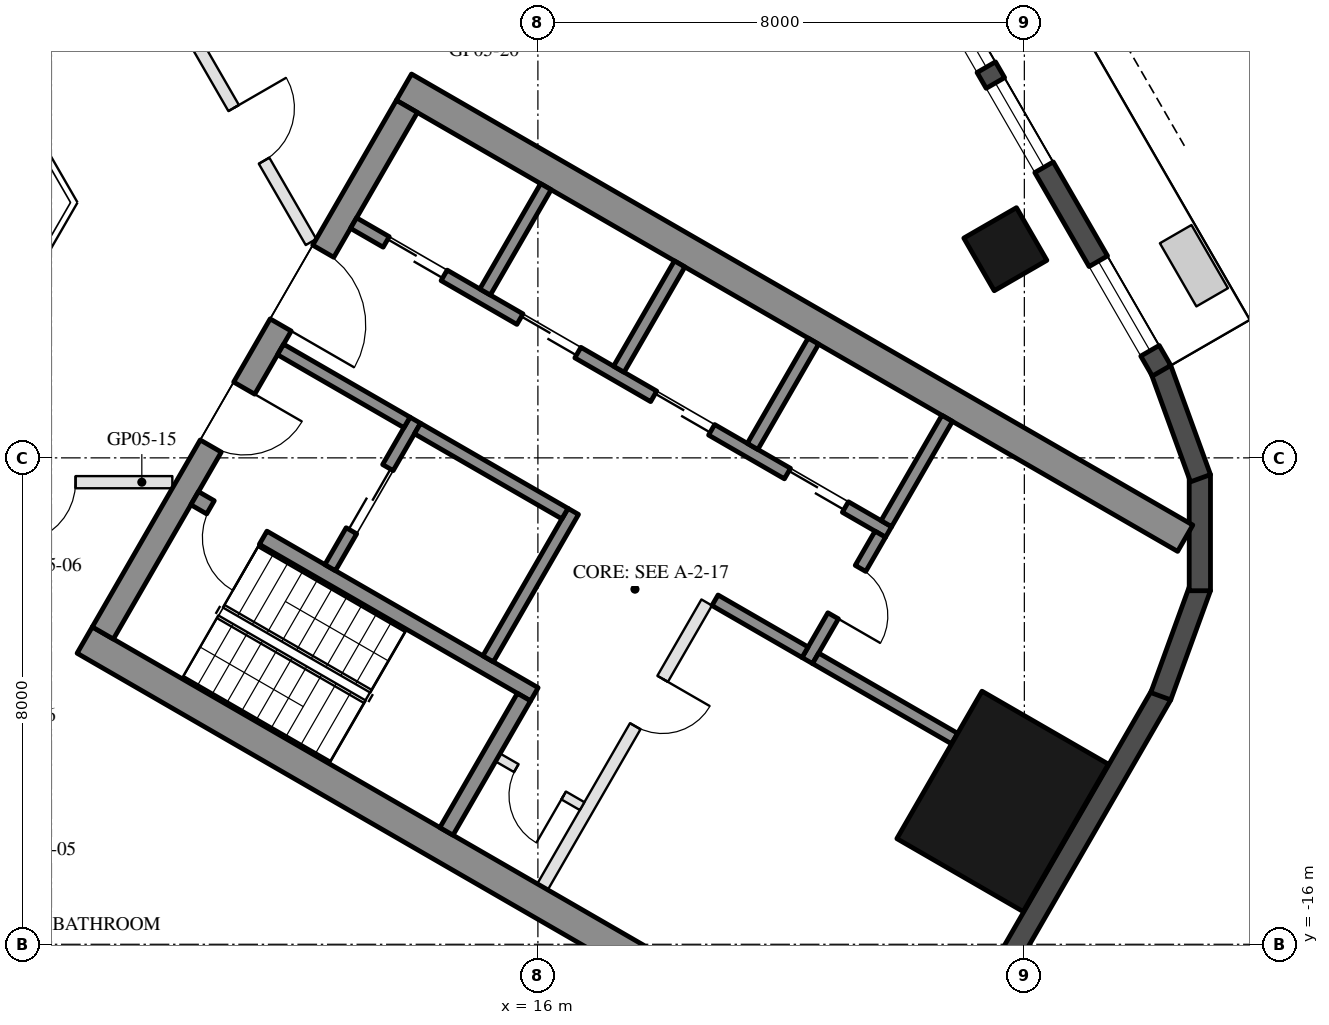
"""IFC4 building model, lengths in metres.
Left out: names, types, materials, properties, quantities, classifications, styles, units other than length and angle.
Written with IfcOpenShell. Run it as: python <this file> out.ifc"""

import sys

from ifc_helpers import new_model, si_unit, direction, frame, frame_2d, origin, origin_2d, place, context, subcontext, project, spatial, rectangle, hollow_rectangle, extrude, element, fill, save


model = new_model("IFC4")
c1 = context("Model", 3, precision=1e-05, world=origin(), true_north=direction((0.0, 1.0)))
c2 = subcontext(c1, "Body", "Model", "MODEL_VIEW")
j1 = project(units=[si_unit("LENGTHUNIT", "METRE"), si_unit("PLANEANGLEUNIT", "RADIAN")], contexts=[c1])
p1 = place(None, origin())
s1 = spatial("IfcSite", under=j1, at=p1, CompositionType="ELEMENT")
p2 = place(p1, origin())
s2 = spatial("IfcBuilding", under=s1, at=p2, CompositionType="ELEMENT")
p3 = place(p2, frame((0.0, 0.0, 83.5)))
s3 = spatial("IfcBuildingStorey", under=s2, at=p3, CompositionType="ELEMENT", Elevation=83.5)
p4 = place(p3, frame((23.688, -4.568, 0.0), z_axis=(0.0, 0.0, 1.0), x_axis=(-0.5, 0.866025403784, 0.0)))
e1 = element("IfcColumn", 1, at=p4, inside=s3, PredefinedType="COLUMN", context=c2, shape_type="SweptSolid", body=[
    extrude(hollow_rectangle(XDim=1.0, YDim=1.0, WallThickness=0.045, at=origin_2d()), origin(), (0.0, 0.0, 1.0), 3.7),
])
p5 = place(p3, frame((23.643, -13.65, 0.0), z_axis=(0.0, 0.0, 1.0), x_axis=(0.5, 0.866025403784, 0.0)))
e2 = element("IfcColumn", 2, at=p5, inside=s3, PredefinedType="COLUMN", context=c2, shape_type="SweptSolid", body=[
    extrude(hollow_rectangle(XDim=2.8, YDim=2.4, WallThickness=0.07, at=origin_2d()), origin(), (0.0, 0.0, 1.0), 3.7),
])
p6 = place(p3, frame((23.427, -16.792, 0.0), z_axis=(0.0, 0.0, 1.0), x_axis=(0.500018773155, 0.866014564827, 0.0)))
e3 = element("IfcWall", 3, at=p6, inside=s3, PredefinedType="SOLIDWALL", context=c2, shape_type="SweptSolid", body=[
    extrude(rectangle(XDim=5.658, YDim=0.35, at=frame_2d((2.829, 0.0))), origin(), (0.0, 0.0, 1.0), 3.55),
])
for number, where, z_axis, x_axis in (
    (4, (26.244, -11.92, 0.0), (0.0, 0.0, 1.0), (0.342, 0.94, 0.0)),
    (5, (26.886, -10.185, 0.0), (0.0, 0.0, 1.0), (0.0, 1.0, 0.0)),
    (6, (26.897, -8.335, 0.0), (0.0, 0.0, 1.0), (-0.342, 0.94, 0.0)),
):
    element("IfcWall", number, at=place(p3, frame(where, z_axis=z_axis, x_axis=x_axis)), inside=s3, PredefinedType="SOLIDWALL", context=c2, shape_type="SweptSolid", body=[
        extrude(rectangle(XDim=1.91, YDim=0.35, at=frame_2d((0.955, 0.0))), origin(), (0.0, 0.0, 1.0), 3.55),
    ])
p7 = place(p3, frame((26.257, -6.567, 0.0), z_axis=(0.0, 0.0, 1.0), x_axis=(-0.500023526245, 0.866011820475, 0.0)))
e7 = element("IfcWall", 7, at=p7, inside=s3, PredefinedType="SOLIDWALL", context=c2, shape_type="SweptSolid", body=[
    extrude(rectangle(XDim=11.816, YDim=0.35, at=frame_2d((5.908, 0.0))), origin(), (0.0, 0.0, 1.0), 3.55),
])
p8 = place(p7, frame((0.38, 0.0, 0.3)))
e8 = element("IfcOpeningElement", 8, at=p8, cuts=e7, PredefinedType="OPENING", context=c2, shape_type="SweptSolid", body=[
    extrude(rectangle(XDim=1.7, YDim=2.65, at=frame_2d((0.85, 1.325))), frame((0.0, 0.185, 0.0), z_axis=(0.0, -1.0, 0.0), x_axis=(1.0, 0.0, 0.0)), (0.0, 0.0, 1.0), 0.37),
])
p9 = place(p7, frame((7.666, 0.0, 0.0)))
e9 = element("IfcOpeningElement", 9, at=p9, cuts=e7, PredefinedType="OPENING", context=c2, shape_type="SweptSolid", body=[
    extrude(rectangle(XDim=2.4, YDim=2.4, at=frame_2d((1.2, 1.2))), frame((0.0, 0.185, 0.0), z_axis=(0.0, -1.0, 0.0), x_axis=(1.0, 0.0, 0.0)), (0.0, 0.0, 1.0), 0.37),
])
p10 = place(p7, frame((3.865, 0.0, 0.3)))
e10 = element("IfcOpeningElement", 10, at=p10, cuts=e7, PredefinedType="OPENING", context=c2, shape_type="SweptSolid", body=[
    extrude(rectangle(XDim=1.6, YDim=2.65, at=frame_2d((0.8, 1.325))), frame((0.0, 0.185, 0.0), z_axis=(0.0, -1.0, 0.0), x_axis=(1.0, 0.0, 0.0)), (0.0, 0.0, 1.0), 0.37),
])
p11 = place(p7, frame((5.765, 0.0, 0.3)))
e11 = element("IfcOpeningElement", 11, at=p11, cuts=e7, PredefinedType="OPENING", context=c2, shape_type="SweptSolid", body=[
    extrude(rectangle(XDim=1.6, YDim=2.65, at=frame_2d((0.8, 1.325))), frame((0.0, 0.185, 0.0), z_axis=(0.0, -1.0, 0.0), x_axis=(1.0, 0.0, 0.0)), (0.0, 0.0, 1.0), 0.37),
])
for number, where, z_axis, x_axis in (
    (12, (8.547, -10.997, 0.0), (0.0, 0.0, 1.0), (0.866, -0.5, 0.0)),
    (13, (13.797, -1.903, 0.0), (0.0, 0.0, 1.0), (0.866, -0.5, 0.0)),
):
    element("IfcWall", number, at=place(p3, frame(where, z_axis=z_axis, x_axis=x_axis)), inside=s3, PredefinedType="SHEAR", context=c2, shape_type="SweptSolid", body=[
        extrude(rectangle(XDim=14.837, YDim=0.5, at=frame_2d((7.418, 0.0))), origin(), (0.0, 0.0, 1.0), 3.5),
    ])
p12 = place(p3, frame((8.845, -10.88, 0.0), z_axis=(0.0, 0.0, 1.0), x_axis=(0.500004234368, 0.866022959057, 0.0)))
e14 = element("IfcWall", 14, at=p12, inside=s3, PredefinedType="SHEAR", context=c2, shape_type="SweptSolid", body=[
    extrude(rectangle(XDim=10.0, YDim=0.4, at=frame_2d((5.0, 0.0))), origin(), (0.0, 0.0, 1.0), 3.5),
])
p13 = place(p12, frame((3.55, 0.0, 0.0)))
e15 = element("IfcOpeningElement", 15, at=p13, cuts=e14, PredefinedType="OPENING", context=c2, shape_type="SweptSolid", body=[
    extrude(rectangle(XDim=1.1, YDim=2.1, at=frame_2d((0.55, 1.05))), frame((0.0, 0.21, 0.0), z_axis=(0.0, -1.0, 0.0), x_axis=(1.0, 0.0, 0.0)), (0.0, 0.0, 1.0), 0.42),
])
p14 = place(p12, frame((5.85, 0.0, 0.0)))
e16 = element("IfcOpeningElement", 16, at=p14, cuts=e14, PredefinedType="OPENING", context=c2, shape_type="SweptSolid", body=[
    extrude(rectangle(XDim=1.4, YDim=2.1, at=frame_2d((0.7, 1.05))), frame((0.0, 0.21, 0.0), z_axis=(0.0, -1.0, 0.0), x_axis=(1.0, 0.0, 0.0)), (0.0, 0.0, 1.0), 0.42),
])
p15 = place(p3, frame((10.356, -8.664, 0.0), z_axis=(0.0, 0.0, 1.0), x_axis=(0.866028629588, -0.499994412703, 0.0)))
e17 = element("IfcWall", 17, at=p15, inside=s3, PredefinedType="SHEAR", context=c2, shape_type="SweptSolid", body=[
    extrude(rectangle(XDim=6.45, YDim=0.25, at=frame_2d((3.225, 0.0))), origin(), (0.0, 0.0, 1.0), 3.5),
])
p16 = place(p15, frame((0.3, 0.0, 0.0)))
e18 = element("IfcOpeningElement", 18, at=p16, cuts=e17, PredefinedType="OPENING", context=c2, shape_type="SweptSolid", body=[
    extrude(rectangle(XDim=1.0, YDim=2.1, at=frame_2d((0.5, 1.05))), frame((0.0, 0.135, 0.0), z_axis=(0.0, -1.0, 0.0), x_axis=(1.0, 0.0, 0.0)), (0.0, 0.0, 1.0), 0.27),
])
p17 = place(p3, frame((14.496, -14.143, 0.0), z_axis=(0.0, 0.0, 1.0), x_axis=(0.500062241894, 0.865989465428, 0.0)))
e19 = element("IfcWall", 19, at=p17, inside=s3, PredefinedType="SHEAR", context=c2, shape_type="SweptSolid", body=[
    extrude(rectangle(XDim=2.55, YDim=0.25, at=frame_2d((1.275, 0.0))), origin(), (0.0, 0.0, 1.0), 3.5),
])
p18 = place(p3, frame((15.181, -11.305, 0.0), z_axis=(0.0, 0.0, 1.0), x_axis=(0.49994636267, 0.866056369097, 0.0)))
e20 = element("IfcWall", 20, at=p18, inside=s3, PredefinedType="SHEAR", context=c2, shape_type="SweptSolid", body=[
    extrude(rectangle(XDim=2.8, YDim=0.2, at=frame_2d((1.4, 0.0))), origin(), (0.0, 0.0, 1.0), 3.5),
])
p19 = place(p3, frame((12.583, -9.805, 0.0), z_axis=(0.0, 0.0, 1.0), x_axis=(0.49994636267, 0.866056369097, 0.0)))
e21 = element("IfcWall", 21, at=p19, inside=s3, PredefinedType="SHEAR", context=c2, shape_type="SweptSolid", body=[
    extrude(rectangle(XDim=2.8, YDim=0.2, at=frame_2d((1.4, 0.0))), origin(), (0.0, 0.0, 1.0), 3.5),
])
p20 = place(p19, frame((0.7, 0.0, 0.0)))
e22 = element("IfcOpeningElement", 22, at=p20, cuts=e21, PredefinedType="OPENING", context=c2, shape_type="SweptSolid", body=[
    extrude(rectangle(XDim=1.2, YDim=2.1, at=frame_2d((0.6, 1.05))), frame((0.0, 0.11, 0.0), z_axis=(0.0, -1.0, 0.0), x_axis=(1.0, 0.0, 0.0)), (0.0, 0.0, 1.0), 0.22),
])
p21 = place(p3, frame((11.768, -6.217, 0.0), z_axis=(0.0, 0.0, 1.0), x_axis=(0.866050077142, -0.499957262057, 0.0)))
e23 = element("IfcWall", 23, at=p21, inside=s3, PredefinedType="SHEAR", context=c2, shape_type="SweptSolid", body=[
    extrude(rectangle(XDim=2.4, YDim=0.2, at=frame_2d((1.2, 0.0))), origin(), (0.0, 0.0, 1.0), 3.5),
])
p22 = place(p3, frame((14.02, -7.517, 0.0), z_axis=(0.0, 0.0, 1.0), x_axis=(0.866034573852, -0.49998411664, 0.0)))
e24 = element("IfcWall", 24, at=p22, inside=s3, PredefinedType="SHEAR", context=c2, shape_type="SweptSolid", body=[
    extrude(rectangle(XDim=2.8, YDim=0.2, at=frame_2d((1.4, 0.0))), origin(), (0.0, 0.0, 1.0), 3.5),
])
p23 = place(p3, frame((12.968, -4.138, 0.0), z_axis=(0.0, 0.0, 1.0), x_axis=(0.866028328073, -0.49999493495, 0.0)))
e25 = element("IfcWall", 25, at=p23, inside=s3, PredefinedType="SHEAR", context=c2, shape_type="SweptSolid", body=[
    extrude(rectangle(XDim=10.16, YDim=0.2, at=frame_2d((5.08, 0.0))), origin(), (0.0, 0.0, 1.0), 3.5),
])
p24 = place(p23, frame((0.62, 0.0, 0.0)))
e26 = element("IfcOpeningElement", 26, at=p24, cuts=e25, PredefinedType="OPENING", context=c2, shape_type="SweptSolid", body=[
    extrude(rectangle(XDim=1.1, YDim=2.1, at=frame_2d((0.55, 1.05))), frame((0.0, 0.11, 0.0), z_axis=(0.0, -1.0, 0.0), x_axis=(1.0, 0.0, 0.0)), (0.0, 0.0, 1.0), 0.22),
])
p25 = place(p23, frame((3.16, 0.0, 0.0)))
e27 = element("IfcOpeningElement", 27, at=p25, cuts=e25, PredefinedType="OPENING", context=c2, shape_type="SweptSolid", body=[
    extrude(rectangle(XDim=1.1, YDim=2.1, at=frame_2d((0.55, 1.05))), frame((0.0, 0.11, 0.0), z_axis=(0.0, -1.0, 0.0), x_axis=(1.0, 0.0, 0.0)), (0.0, 0.0, 1.0), 0.22),
])
p26 = place(p23, frame((5.7, 0.0, 0.0)))
e28 = element("IfcOpeningElement", 28, at=p26, cuts=e25, PredefinedType="OPENING", context=c2, shape_type="SweptSolid", body=[
    extrude(rectangle(XDim=1.1, YDim=2.1, at=frame_2d((0.55, 1.05))), frame((0.0, 0.11, 0.0), z_axis=(0.0, -1.0, 0.0), x_axis=(1.0, 0.0, 0.0)), (0.0, 0.0, 1.0), 0.22),
])
p27 = place(p23, frame((8.24, 0.0, 0.0)))
e29 = element("IfcOpeningElement", 29, at=p27, cuts=e25, PredefinedType="OPENING", context=c2, shape_type="SweptSolid", body=[
    extrude(rectangle(XDim=1.1, YDim=2.1, at=frame_2d((0.55, 1.05))), frame((0.0, 0.11, 0.0), z_axis=(0.0, -1.0, 0.0), x_axis=(1.0, 0.0, 0.0)), (0.0, 0.0, 1.0), 0.22),
])
p28 = place(p3, frame((20.43, -11.333, 0.0), z_axis=(0.0, 0.0, 1.0), x_axis=(0.500001309137, 0.866024647952, 0.0)))
e30 = element("IfcWall", 30, at=p28, inside=s3, PredefinedType="SHEAR", context=c2, shape_type="SweptSolid", body=[
    extrude(rectangle(XDim=2.4, YDim=0.2, at=frame_2d((1.2, 0.0))), origin(), (0.0, 0.0, 1.0), 3.5),
])
p29 = place(p28, frame((0.85, 0.0, 0.0)))
e31 = element("IfcOpeningElement", 31, at=p29, cuts=e30, PredefinedType="OPENING", context=c2, shape_type="SweptSolid", body=[
    extrude(rectangle(XDim=0.9, YDim=2.1, at=frame_2d((0.45, 1.05))), frame((0.0, 0.11, 0.0), z_axis=(0.0, -1.0, 0.0), x_axis=(1.0, 0.0, 0.0)), (0.0, 0.0, 1.0), 0.22),
])
p30 = place(p3, frame((18.913, -10.342, 0.0), z_axis=(0.0, 0.0, 1.0), x_axis=(0.866038183914, -0.499977863513, 0.0)))
e32 = element("IfcWall", 32, at=p30, inside=s3, PredefinedType="SHEAR", context=c2, shape_type="SweptSolid", body=[
    extrude(rectangle(XDim=1.71, YDim=0.2, at=frame_2d((0.855, 0.0))), origin(), (0.0, 0.0, 1.0), 3.5),
])
for number, where, z_axis, x_axis in (
    (33, (15.131, -5.272, 0.0), (0.0, 0.0, 1.0), (0.5, 0.866, 0.0)),
    (34, (17.331, -6.542, 0.0), (0.0, 0.0, 1.0), (0.5, 0.866, 0.0)),
    (35, (19.531, -7.812, 0.0), (0.0, 0.0, 1.0), (0.5, 0.866, 0.0)),
    (36, (21.73, -9.082, 0.0), (0.0, 0.0, 1.0), (0.5, 0.866, 0.0)),
):
    element("IfcWall", number, at=place(p3, frame(where, z_axis=z_axis, x_axis=x_axis)), inside=s3, PredefinedType="SHEAR", context=c2, shape_type="SweptSolid", body=[
        extrude(rectangle(XDim=2.0, YDim=0.2, at=frame_2d((1.0, 0.0))), origin(), (0.0, 0.0, 1.0), 3.5),
    ])
p31 = place(p3, frame((20.567, -11.297, 0.0), z_axis=(0.0, 0.0, 1.0), x_axis=(0.866060851709, -0.499938597367, 0.0)))
e37 = element("IfcWall", 37, at=p31, inside=s3, PredefinedType="SHEAR", context=c2, shape_type="SweptSolid", body=[
    extrude(rectangle(XDim=2.64, YDim=0.2, at=frame_2d((1.32, 0.0))), origin(), (0.0, 0.0, 1.0), 3.5),
])
p32 = place(p3, frame((16.076, -15.055, 0.0), z_axis=(0.0, 0.0, 1.0), x_axis=(0.499995103361, 0.866028230842, 0.0)))
e38 = element("IfcWall", 38, at=p32, inside=s3, PredefinedType="PARTITIONING", context=c2, shape_type="SweptSolid", body=[
    extrude(rectangle(XDim=5.4, YDim=0.2, at=frame_2d((2.7, 0.0))), origin(), (0.0, 0.0, 1.0), 3.5),
])
p33 = place(p32, frame((3.05, 0.0, 0.0)))
e39 = element("IfcOpeningElement", 39, at=p33, cuts=e38, PredefinedType="OPENING", context=c2, shape_type="SweptSolid", body=[
    extrude(rectangle(XDim=0.9, YDim=2.1, at=frame_2d((0.45, 1.05))), frame((0.0, 0.11, 0.0), z_axis=(0.0, -1.0, 0.0), x_axis=(1.0, 0.0, 0.0)), (0.0, 0.0, 1.0), 0.22),
])
p34 = place(p3, frame((15.342, -12.928, 0.0), z_axis=(0.0, 0.0, 1.0), x_axis=(0.865989903783, -0.500061482766, 0.0)))
e40 = element("IfcWall", 40, at=p34, inside=s3, PredefinedType="PARTITIONING", context=c2, shape_type="SweptSolid", body=[
    extrude(rectangle(XDim=1.6, YDim=0.15, at=frame_2d((0.8, 0.0))), origin(), (0.0, 0.0, 1.0), 3.5),
])
p35 = place(p34, frame((0.35, 0.0, 0.0)))
e41 = element("IfcOpeningElement", 41, at=p35, cuts=e40, PredefinedType="OPENING", context=c2, shape_type="SweptSolid", body=[
    extrude(rectangle(XDim=0.9, YDim=2.1, at=frame_2d((0.45, 1.05))), frame((0.0, 0.085, 0.0), z_axis=(0.0, -1.0, 0.0), x_axis=(1.0, 0.0, 0.0)), (0.0, 0.0, 1.0), 0.17),
])
p36 = place(p3, frame((9.988, -8.4, 0.0), z_axis=(0.0, 0.0, 1.0), x_axis=(-1.0, 0.0, 0.0)))
e42 = element("IfcWall", 42, at=p36, inside=s3, PredefinedType="PARTITIONING", context=c2, shape_type="SweptSolid", body=[
    extrude(rectangle(XDim=4.183, YDim=0.2, at=frame_2d((2.091, 0.0))), origin(), (0.0, 0.0, 1.0), 2.95),
])
p37 = place(p36, frame((1.591, 0.0, 0.0)))
e43 = element("IfcOpeningElement", 43, at=p37, cuts=e42, PredefinedType="OPENING", context=c2, shape_type="SweptSolid", body=[
    extrude(rectangle(XDim=1.0, YDim=2.1, at=frame_2d((0.5, 1.05))), frame((0.0, 0.11, 0.0), z_axis=(0.0, -1.0, 0.0), x_axis=(1.0, 0.0, 0.0)), (0.0, 0.0, 1.0), 0.22),
])
p38 = place(p3, frame((10.225, -0.909, 0.0), z_axis=(0.0, 0.0, 1.0), x_axis=(0.500011931275, -0.86601851515, 0.0)))
e44 = element("IfcWall", 44, at=p38, inside=s3, PredefinedType="PARTITIONING", context=c2, shape_type="SweptSolid", body=[
    extrude(rectangle(XDim=4.088, YDim=0.2, at=frame_2d((2.044, 0.0))), origin(), (0.0, 0.0, 1.0), 2.95),
])
p39 = place(p38, frame((1.544, 0.0, 0.0)))
e45 = element("IfcOpeningElement", 45, at=p39, cuts=e44, PredefinedType="OPENING", context=c2, shape_type="SweptSolid", body=[
    extrude(rectangle(XDim=1.0, YDim=2.1, at=frame_2d((0.5, 1.05))), frame((0.0, 0.11, 0.0), z_axis=(0.0, -1.0, 0.0), x_axis=(1.0, 0.0, 0.0)), (0.0, 0.0, 1.0), 0.22),
])
p40 = place(p8, origin())
e46 = element("IfcWindow", 46, at=p40, inside=s3, PartitioningType="SINGLE_PANEL", PredefinedType="WINDOW", context=c2, shape_type="SweptSolid", body=[
    extrude(rectangle(XDim=1.7, YDim=2.65, at=frame_2d((0.85, 1.325))), frame((0.0, 0.03, 0.0), z_axis=(0.0, -1.0, 0.0), x_axis=(1.0, 0.0, 0.0)), (0.0, 0.0, 1.0), 0.06),
])
fill(e8, e46)
p41 = place(p10, origin())
e47 = element("IfcWindow", 47, at=p41, inside=s3, PartitioningType="SINGLE_PANEL", PredefinedType="WINDOW", context=c2, shape_type="SweptSolid", body=[
    extrude(rectangle(XDim=1.6, YDim=2.65, at=frame_2d((0.8, 1.325))), frame((0.0, 0.03, 0.0), z_axis=(0.0, -1.0, 0.0), x_axis=(1.0, 0.0, 0.0)), (0.0, 0.0, 1.0), 0.06),
])
fill(e10, e47)
p42 = place(p11, origin())
e48 = element("IfcWindow", 48, at=p42, inside=s3, PartitioningType="SINGLE_PANEL", PredefinedType="WINDOW", context=c2, shape_type="SweptSolid", body=[
    extrude(rectangle(XDim=1.6, YDim=2.65, at=frame_2d((0.8, 1.325))), frame((0.0, 0.03, 0.0), z_axis=(0.0, -1.0, 0.0), x_axis=(1.0, 0.0, 0.0)), (0.0, 0.0, 1.0), 0.06),
])
fill(e11, e48)
p43 = place(p20, origin())
e49 = element("IfcDoor", 49, at=p43, inside=s3, OperationType="DOUBLE_DOOR_SLIDING", PredefinedType="DOOR", context=c2, shape_type="SweptSolid", body=[
    extrude(rectangle(XDim=1.2, YDim=2.1, at=frame_2d((0.6, 1.05))), frame((0.0, 0.025, 0.0), z_axis=(0.0, -1.0, 0.0), x_axis=(1.0, 0.0, 0.0)), (0.0, 0.0, 1.0), 0.05),
])
fill(e22, e49)
p44 = place(p35, frame((0.9, 0.0, 0.0), z_axis=(0.0, 0.0, 1.0), x_axis=(-1.0, 0.0, 0.0)))
e50 = element("IfcDoor", 50, at=p44, inside=s3, OperationType="SINGLE_SWING_LEFT", PredefinedType="DOOR", context=c2, shape_type="SweptSolid", body=[
    extrude(rectangle(XDim=0.9, YDim=2.1, at=frame_2d((0.45, 1.05))), frame((0.0, 0.025, 0.0), z_axis=(0.0, -1.0, 0.0), x_axis=(1.0, 0.0, 0.0)), (0.0, 0.0, 1.0), 0.05),
])
fill(e41, e50)
p45 = place(p24, origin())
e51 = element("IfcDoor", 51, at=p45, inside=s3, OperationType="DOUBLE_DOOR_SLIDING", PredefinedType="DOOR", context=c2, shape_type="SweptSolid", body=[
    extrude(rectangle(XDim=1.1, YDim=2.1, at=frame_2d((0.55, 1.05))), frame((0.0, 0.025, 0.0), z_axis=(0.0, -1.0, 0.0), x_axis=(1.0, 0.0, 0.0)), (0.0, 0.0, 1.0), 0.05),
])
fill(e26, e51)
p46 = place(p25, origin())
e52 = element("IfcDoor", 52, at=p46, inside=s3, OperationType="DOUBLE_DOOR_SLIDING", PredefinedType="DOOR", context=c2, shape_type="SweptSolid", body=[
    extrude(rectangle(XDim=1.1, YDim=2.1, at=frame_2d((0.55, 1.05))), frame((0.0, 0.025, 0.0), z_axis=(0.0, -1.0, 0.0), x_axis=(1.0, 0.0, 0.0)), (0.0, 0.0, 1.0), 0.05),
])
fill(e27, e52)
p47 = place(p26, origin())
e53 = element("IfcDoor", 53, at=p47, inside=s3, OperationType="DOUBLE_DOOR_SLIDING", PredefinedType="DOOR", context=c2, shape_type="SweptSolid", body=[
    extrude(rectangle(XDim=1.1, YDim=2.1, at=frame_2d((0.55, 1.05))), frame((0.0, 0.025, 0.0), z_axis=(0.0, -1.0, 0.0), x_axis=(1.0, 0.0, 0.0)), (0.0, 0.0, 1.0), 0.05),
])
fill(e28, e53)
p48 = place(p27, origin())
e54 = element("IfcDoor", 54, at=p48, inside=s3, OperationType="DOUBLE_DOOR_SLIDING", PredefinedType="DOOR", context=c2, shape_type="SweptSolid", body=[
    extrude(rectangle(XDim=1.1, YDim=2.1, at=frame_2d((0.55, 1.05))), frame((0.0, 0.025, 0.0), z_axis=(0.0, -1.0, 0.0), x_axis=(1.0, 0.0, 0.0)), (0.0, 0.0, 1.0), 0.05),
])
fill(e29, e54)
p49 = place(p29, frame((0.9, 0.0, 0.0), z_axis=(0.0, 0.0, 1.0), x_axis=(-1.0, 0.0, 0.0)))
e55 = element("IfcDoor", 55, at=p49, inside=s3, OperationType="SINGLE_SWING_RIGHT", PredefinedType="DOOR", context=c2, shape_type="SweptSolid", body=[
    extrude(rectangle(XDim=0.9, YDim=2.1, at=frame_2d((0.45, 1.05))), frame((0.0, 0.025, 0.0), z_axis=(0.0, -1.0, 0.0), x_axis=(1.0, 0.0, 0.0)), (0.0, 0.0, 1.0), 0.05),
])
fill(e31, e55)
p50 = place(p33, frame((0.9, 0.0, 0.0), z_axis=(0.0, 0.0, 1.0), x_axis=(-1.0, 0.0, 0.0)))
e56 = element("IfcDoor", 56, at=p50, inside=s3, OperationType="SINGLE_SWING_LEFT", PredefinedType="DOOR", context=c2, shape_type="SweptSolid", body=[
    extrude(rectangle(XDim=0.9, YDim=2.1, at=frame_2d((0.45, 1.05))), frame((0.0, 0.025, 0.0), z_axis=(0.0, -1.0, 0.0), x_axis=(1.0, 0.0, 0.0)), (0.0, 0.0, 1.0), 0.05),
])
fill(e39, e56)
p51 = place(p13, frame((1.1, 0.0, 0.0), z_axis=(0.0, 0.0, 1.0), x_axis=(-1.0, 0.0, 0.0)))
e57 = element("IfcDoor", 57, at=p51, inside=s3, OperationType="SINGLE_SWING_LEFT", PredefinedType="DOOR", context=c2, shape_type="SweptSolid", body=[
    extrude(rectangle(XDim=1.1, YDim=2.1, at=frame_2d((0.55, 1.05))), frame((0.0, 0.025, 0.0), z_axis=(0.0, -1.0, 0.0), x_axis=(1.0, 0.0, 0.0)), (0.0, 0.0, 1.0), 0.05),
])
fill(e15, e57)
p52 = place(p14, frame((1.4, 0.0, 0.0), z_axis=(0.0, 0.0, 1.0), x_axis=(-1.0, 0.0, 0.0)))
e58 = element("IfcDoor", 58, at=p52, inside=s3, OperationType="DOUBLE_DOOR_SINGLE_SWING", PredefinedType="DOOR", context=c2, shape_type="SweptSolid", body=[
    extrude(rectangle(XDim=1.4, YDim=2.1, at=frame_2d((0.7, 1.05))), frame((0.0, 0.025, 0.0), z_axis=(0.0, -1.0, 0.0), x_axis=(1.0, 0.0, 0.0)), (0.0, 0.0, 1.0), 0.05),
])
fill(e16, e58)
p53 = place(p16, frame((1.0, 0.0, 0.0), z_axis=(0.0, 0.0, 1.0), x_axis=(-1.0, 0.0, 0.0)))
e59 = element("IfcDoor", 59, at=p53, inside=s3, OperationType="SINGLE_SWING_LEFT", PredefinedType="DOOR", context=c2, shape_type="SweptSolid", body=[
    extrude(rectangle(XDim=1.0, YDim=2.1, at=frame_2d((0.5, 1.05))), frame((0.0, 0.025, 0.0), z_axis=(0.0, -1.0, 0.0), x_axis=(1.0, 0.0, 0.0)), (0.0, 0.0, 1.0), 0.05),
])
fill(e18, e59)
p54 = place(p37, origin())
e60 = element("IfcDoor", 60, at=p54, inside=s3, OperationType="SINGLE_SWING_RIGHT", PredefinedType="DOOR", context=c2, shape_type="SweptSolid", body=[
    extrude(rectangle(XDim=1.0, YDim=2.1, at=frame_2d((0.5, 1.05))), frame((0.0, 0.025, 0.0), z_axis=(0.0, -1.0, 0.0), x_axis=(1.0, 0.0, 0.0)), (0.0, 0.0, 1.0), 0.05),
])
fill(e43, e60)
p55 = place(p39, origin())
e61 = element("IfcDoor", 61, at=p55, inside=s3, OperationType="SINGLE_SWING_LEFT", PredefinedType="DOOR", context=c2, shape_type="SweptSolid", body=[
    extrude(rectangle(XDim=1.0, YDim=2.1, at=frame_2d((0.5, 1.05))), frame((0.0, 0.025, 0.0), z_axis=(0.0, -1.0, 0.0), x_axis=(1.0, 0.0, 0.0)), (0.0, 0.0, 1.0), 0.05),
])
fill(e45, e61)
save(model, sys.argv[1])
